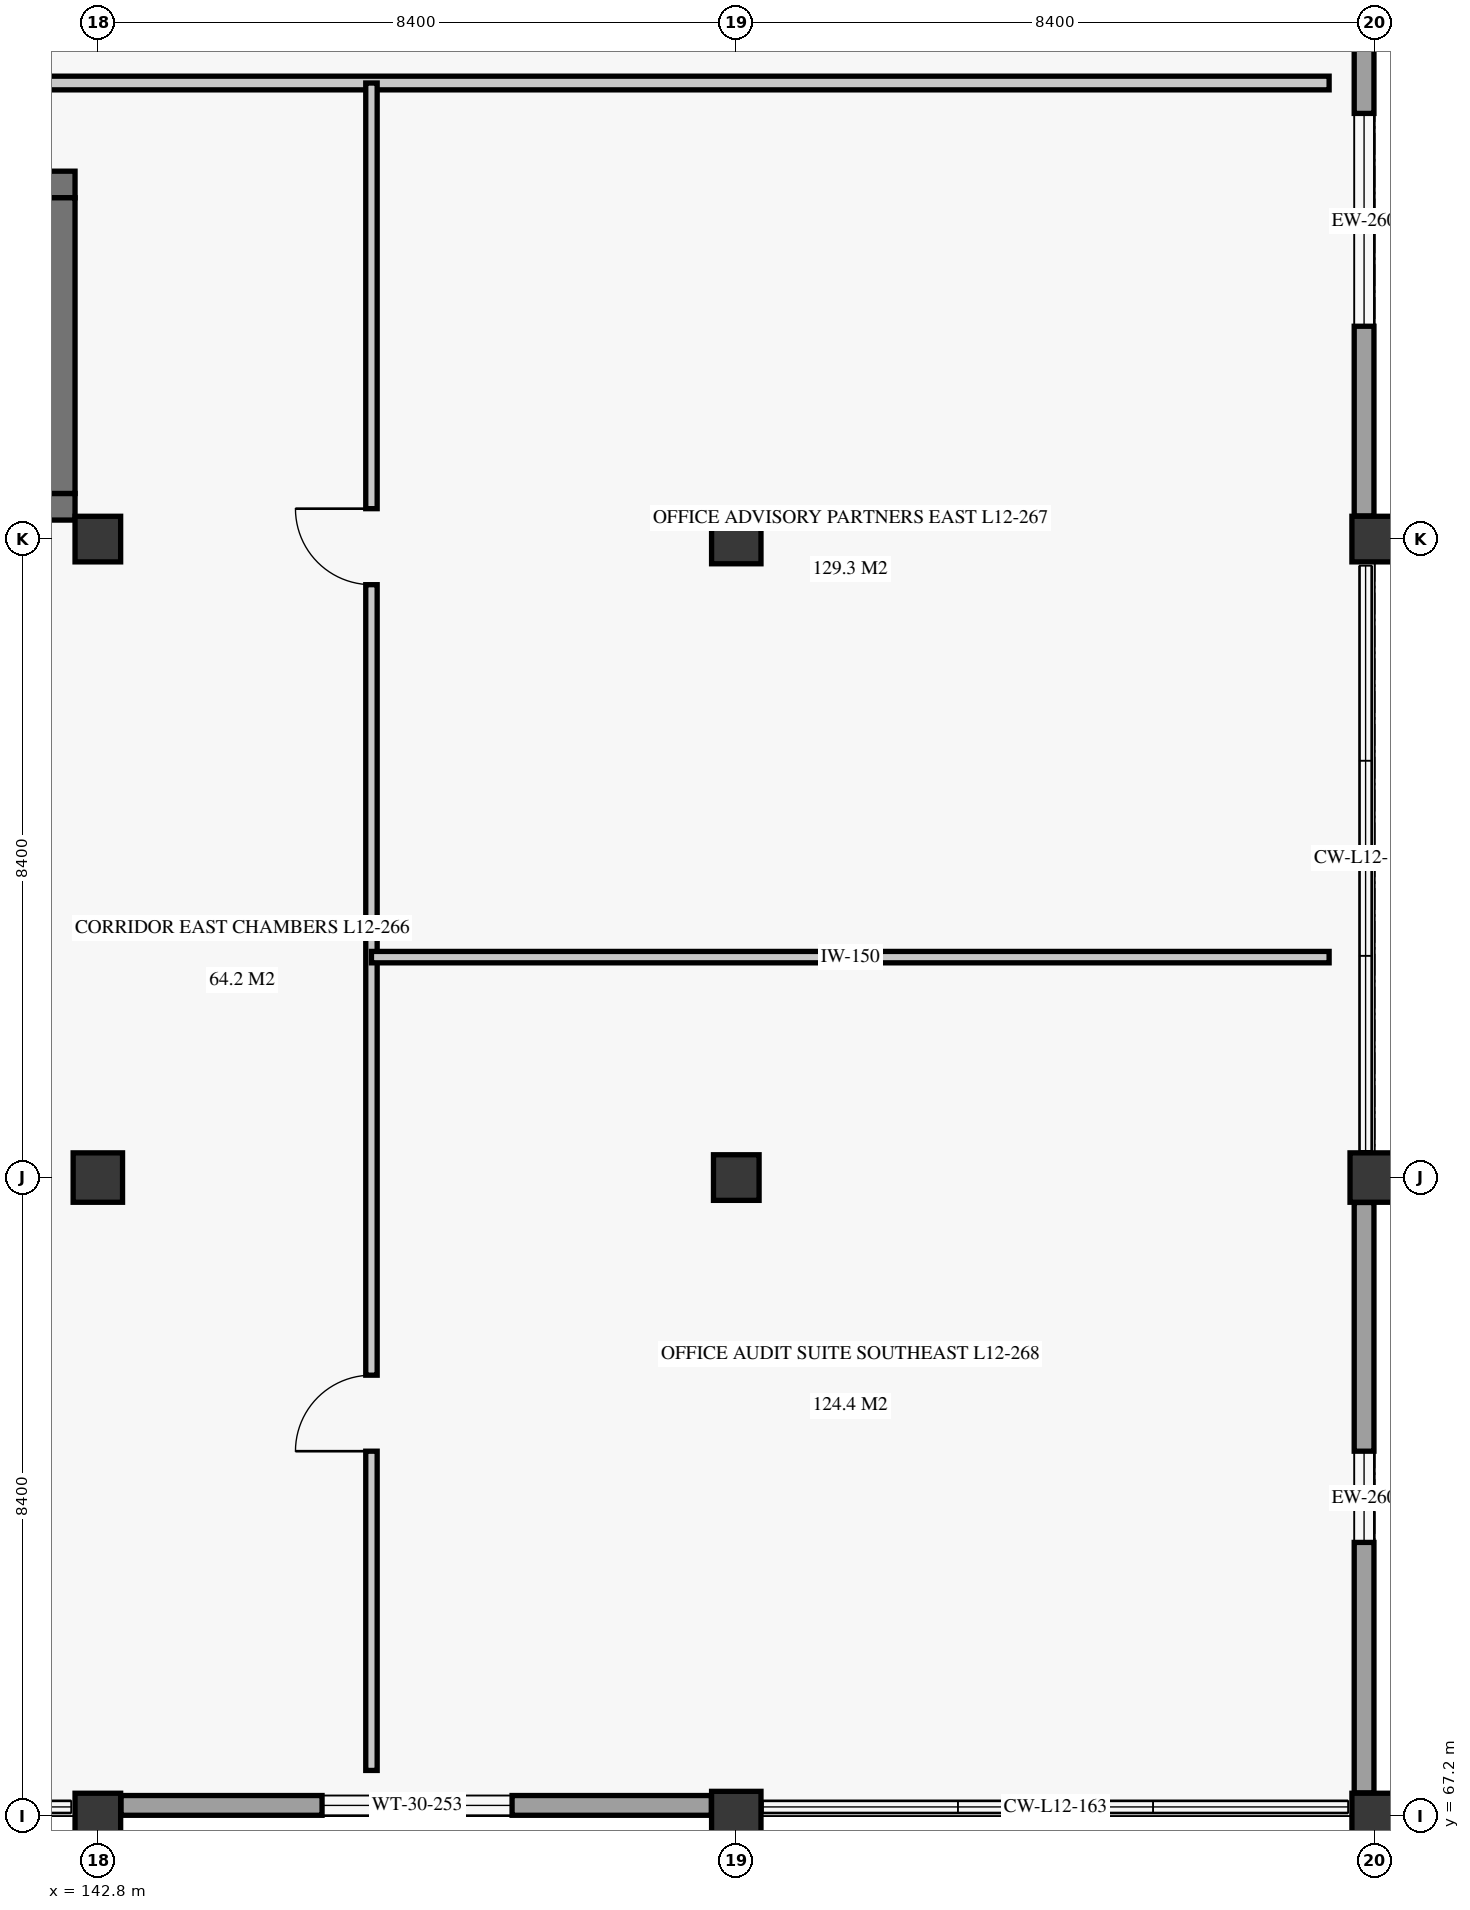
"""IFC4 building model, lengths in metres.
Left out: names, types, materials, properties, quantities, classifications, styles, units other than length and angle.
Written with IfcOpenShell. Run it as: python <this file> out.ifc"""

import sys

from ifc_helpers import new_model, si_unit, direction, frame, frame_2d, origin, origin_2d, place, context, subcontext, project, spatial, rectangle, extrude, element, fill, save


model = new_model("IFC4")
c1 = context("Model", 3, precision=1e-05, world=origin(), true_north=direction((0.0, 1.0)))
c2 = subcontext(c1, "Body", "Model", "MODEL_VIEW")
j1 = project(units=[si_unit("LENGTHUNIT", "METRE"), si_unit("PLANEANGLEUNIT", "RADIAN")], contexts=[c1])
p1 = place(None, origin())
s1 = spatial("IfcSite", under=j1, at=p1, CompositionType="ELEMENT")
p2 = place(p1, origin())
s2 = spatial("IfcBuilding", under=s1, at=p2, CompositionType="ELEMENT")
p3 = place(p2, frame((0.0, 0.0, 50.7)))
s3 = spatial("IfcBuildingStorey", under=s2, at=p3, CompositionType="ELEMENT", Elevation=50.7)
p4 = place(p3, frame((142.8, 67.2, 0.0), z_axis=(0.0, 0.0, 1.0), x_axis=(1.0, 0.0, 0.0)))
e1 = element("IfcColumn", 1, at=p4, inside=s3, PredefinedType="COLUMN", context=c2, shape_type="SweptSolid", body=[
    extrude(rectangle(XDim=0.6, YDim=0.6, at=origin_2d()), origin(), (0.0, 0.0, 1.0), 3.72),
])
p5 = place(p3, frame((142.8, 75.6, 0.0), z_axis=(0.0, 0.0, 1.0), x_axis=(1.0, 0.0, 0.0)))
e2 = element("IfcColumn", 2, at=p5, inside=s3, PredefinedType="COLUMN", context=c2, shape_type="SweptSolid", body=[
    extrude(rectangle(XDim=0.65, YDim=0.65, at=origin_2d()), origin(), (0.0, 0.0, 1.0), 3.72),
])
p6 = place(p3, frame((142.8, 84.0, 0.0), z_axis=(0.0, 0.0, 1.0), x_axis=(1.0, 0.0, 0.0)))
e3 = element("IfcColumn", 3, at=p6, inside=s3, PredefinedType="COLUMN", context=c2, shape_type="SweptSolid", body=[
    extrude(rectangle(XDim=0.6, YDim=0.6, at=origin_2d()), origin(), (0.0, 0.0, 1.0), 3.72),
])
p7 = place(p3, frame((151.2, 67.2, 0.0), z_axis=(0.0, 0.0, 1.0), x_axis=(1.0, 0.0, 0.0)))
e4 = element("IfcColumn", 4, at=p7, inside=s3, PredefinedType="COLUMN", context=c2, shape_type="SweptSolid", body=[
    extrude(rectangle(XDim=0.65, YDim=0.65, at=origin_2d()), origin(), (0.0, 0.0, 1.0), 3.72),
])
p8 = place(p3, frame((151.2, 75.6, 0.0), z_axis=(0.0, 0.0, 1.0), x_axis=(1.0, 0.0, 0.0)))
e5 = element("IfcColumn", 5, at=p8, inside=s3, PredefinedType="COLUMN", context=c2, shape_type="SweptSolid", body=[
    extrude(rectangle(XDim=0.6, YDim=0.6, at=origin_2d()), origin(), (0.0, 0.0, 1.0), 3.72),
])
p9 = place(p3, frame((151.2, 84.0, 0.0), z_axis=(0.0, 0.0, 1.0), x_axis=(1.0, 0.0, 0.0)))
e6 = element("IfcColumn", 6, at=p9, inside=s3, PredefinedType="COLUMN", context=c2, shape_type="SweptSolid", body=[
    extrude(rectangle(XDim=0.65, YDim=0.65, at=origin_2d()), origin(), (0.0, 0.0, 1.0), 3.72),
])
p10 = place(p3, frame((159.6, 67.2, 0.0), z_axis=(0.0, 0.0, 1.0), x_axis=(1.0, 0.0, 0.0)))
e7 = element("IfcColumn", 7, at=p10, inside=s3, PredefinedType="COLUMN", context=c2, shape_type="SweptSolid", body=[
    extrude(rectangle(XDim=0.6, YDim=0.6, at=origin_2d()), origin(), (0.0, 0.0, 1.0), 3.72),
])
p11 = place(p3, frame((159.6, 75.6, 0.0), z_axis=(0.0, 0.0, 1.0), x_axis=(1.0, 0.0, 0.0)))
e8 = element("IfcColumn", 8, at=p11, inside=s3, PredefinedType="COLUMN", context=c2, shape_type="SweptSolid", body=[
    extrude(rectangle(XDim=0.65, YDim=0.65, at=origin_2d()), origin(), (0.0, 0.0, 1.0), 3.72),
])
p12 = place(p3, frame((159.6, 84.0, 0.0), z_axis=(0.0, 0.0, 1.0), x_axis=(1.0, 0.0, 0.0)))
e9 = element("IfcColumn", 9, at=p12, inside=s3, PredefinedType="COLUMN", context=c2, shape_type="SweptSolid", body=[
    extrude(rectangle(XDim=0.6, YDim=0.6, at=origin_2d()), origin(), (0.0, 0.0, 1.0), 3.72),
])
p13 = place(p3, frame((143.104, 67.34, 0.0), z_axis=(0.0, 0.0, 1.0), x_axis=(1.0, 0.0, 0.0)))
e10 = element("IfcWall", 10, at=p13, inside=s3, PredefinedType="SOLIDWALL", context=c2, shape_type="SweptSolid", body=[
    extrude(rectangle(XDim=7.768, YDim=0.26, at=frame_2d((3.884, 0.0))), origin(), (0.0, 0.0, 1.0), 3.04),
])
p14 = place(p13, frame((2.646, 0.0, 0.85)))
e11 = element("IfcOpeningElement", 11, at=p14, cuts=e10, PredefinedType="OPENING", context=c2, shape_type="SweptSolid", body=[
    extrude(rectangle(XDim=2.5, YDim=1.8, at=frame_2d((1.25, 0.9))), frame((0.0, 0.14, 0.0), z_axis=(0.0, -1.0, 0.0), x_axis=(1.0, 0.0, 0.0)), (0.0, 0.0, 1.0), 0.28),
])
p15 = place(p3, frame((159.46, 67.504, 0.0), z_axis=(0.0, 0.0, 1.0), x_axis=(0.0, 1.0, 0.0)))
e12 = element("IfcWall", 12, at=p15, inside=s3, PredefinedType="SOLIDWALL", context=c2, shape_type="SweptSolid", body=[
    extrude(rectangle(XDim=7.768, YDim=0.26, at=frame_2d((3.884, 0.0))), origin(), (0.0, 0.0, 1.0), 3.04),
])
p16 = place(p15, frame((3.296, 0.0, 0.85)))
e13 = element("IfcOpeningElement", 13, at=p16, cuts=e12, PredefinedType="OPENING", context=c2, shape_type="SweptSolid", body=[
    extrude(rectangle(XDim=1.2, YDim=1.6, at=frame_2d((0.6, 0.8))), frame((0.0, 0.14, 0.0), z_axis=(0.0, -1.0, 0.0), x_axis=(1.0, 0.0, 0.0)), (0.0, 0.0, 1.0), 0.28),
])
p17 = place(p3, frame((159.46, 84.304, 0.0), z_axis=(0.0, 0.0, 1.0), x_axis=(0.0, 1.0, 0.0)))
e14 = element("IfcWall", 14, at=p17, inside=s3, PredefinedType="SOLIDWALL", context=c2, shape_type="SweptSolid", body=[
    extrude(rectangle(XDim=7.768, YDim=0.26, at=frame_2d((3.884, 0.0))), origin(), (0.0, 0.0, 1.0), 3.04),
])
p18 = place(p17, frame((2.496, 0.0, 0.85)))
e15 = element("IfcOpeningElement", 15, at=p18, cuts=e14, PredefinedType="OPENING", context=c2, shape_type="SweptSolid", body=[
    extrude(rectangle(XDim=2.8, YDim=1.85, at=frame_2d((1.4, 0.925))), frame((0.0, 0.14, 0.0), z_axis=(0.0, -1.0, 0.0), x_axis=(1.0, 0.0, 0.0)), (0.0, 0.0, 1.0), 0.28),
])
p19 = place(p3, frame((132.75, 84.425, 0.0), z_axis=(0.0, 0.0, 1.0), x_axis=(1.0, 0.0, 0.0)))
e16 = element("IfcWall", 16, at=p19, inside=s3, PredefinedType="SHEAR", context=c2, shape_type="SweptSolid", body=[
    extrude(rectangle(XDim=9.75, YDim=0.35, at=frame_2d((4.875, 0.0))), origin(), (0.0, 0.0, 1.0), 3.72),
])
p20 = place(p3, frame((132.75, 88.665, 0.0), z_axis=(0.0, 0.0, 1.0), x_axis=(1.0, 0.0, 0.0)))
e17 = element("IfcWall", 17, at=p20, inside=s3, PredefinedType="SHEAR", context=c2, shape_type="SweptSolid", body=[
    extrude(rectangle(XDim=9.75, YDim=0.35, at=frame_2d((4.875, 0.0))), origin(), (0.0, 0.0, 1.0), 3.72),
])
p21 = place(p20, frame((0.72, 0.0, 0.0)))
e18 = element("IfcOpeningElement", 18, at=p21, cuts=e17, PredefinedType="OPENING", context=c2, shape_type="SweptSolid", body=[
    extrude(rectangle(XDim=1.25, YDim=2.2, at=frame_2d((0.625, 1.1))), frame((0.0, 0.185, 0.0), z_axis=(0.0, -1.0, 0.0), x_axis=(1.0, 0.0, 0.0)), (0.0, 0.0, 1.0), 0.37),
])
p22 = place(p3, frame((142.325, 84.6, 0.0), z_axis=(0.0, 0.0, 1.0), x_axis=(0.0, 1.0, 0.0)))
e19 = element("IfcWall", 19, at=p22, inside=s3, PredefinedType="SHEAR", context=c2, shape_type="SweptSolid", body=[
    extrude(rectangle(XDim=3.89, YDim=0.35, at=frame_2d((1.945, 0.0))), origin(), (0.0, 0.0, 1.0), 3.72),
])
p23 = place(p3, frame((118.2, 90.0, 0.0), z_axis=(0.0, 0.0, 1.0), x_axis=(1.0, 0.0, 0.0)))
e20 = element("IfcWall", 20, at=p23, inside=s3, PredefinedType="PARTITIONING", context=c2, shape_type="SweptSolid", body=[
    extrude(rectangle(XDim=40.8, YDim=0.18, at=frame_2d((20.4, 0.0))), origin(), (0.0, 0.0, 1.0), 3.34),
])
p24 = place(p23, frame((3.2, 0.0, 0.0)))
e21 = element("IfcOpeningElement", 21, at=p24, cuts=e20, PredefinedType="OPENING", context=c2, shape_type="SweptSolid", body=[
    extrude(rectangle(XDim=1.05, YDim=2.2, at=frame_2d((0.525, 1.1))), frame((0.0, 0.1, 0.0), z_axis=(0.0, -1.0, 0.0), x_axis=(1.0, 0.0, 0.0)), (0.0, 0.0, 1.0), 0.2),
])
p25 = place(p23, frame((20.6, 0.0, 0.0)))
e22 = element("IfcOpeningElement", 22, at=p25, cuts=e20, PredefinedType="OPENING", context=c2, shape_type="SweptSolid", body=[
    extrude(rectangle(XDim=1.05, YDim=2.2, at=frame_2d((0.525, 1.1))), frame((0.0, 0.1, 0.0), z_axis=(0.0, -1.0, 0.0), x_axis=(1.0, 0.0, 0.0)), (0.0, 0.0, 1.0), 0.2),
])
p26 = place(p3, frame((146.4, 67.8, 0.0), z_axis=(0.0, 0.0, 1.0), x_axis=(0.0, 1.0, 0.0)))
e23 = element("IfcWall", 23, at=p26, inside=s3, PredefinedType="PARTITIONING", context=c2, shape_type="SweptSolid", body=[
    extrude(rectangle(XDim=22.2, YDim=0.15, at=frame_2d((11.1, 0.0))), origin(), (0.0, 0.0, 1.0), 3.34),
])
p27 = place(p26, frame((4.2, 0.0, 0.0)))
e24 = element("IfcOpeningElement", 24, at=p27, cuts=e23, PredefinedType="OPENING", context=c2, shape_type="SweptSolid", body=[
    extrude(rectangle(XDim=1.0, YDim=2.1, at=frame_2d((0.5, 1.05))), frame((0.0, 0.085, 0.0), z_axis=(0.0, -1.0, 0.0), x_axis=(1.0, 0.0, 0.0)), (0.0, 0.0, 1.0), 0.17),
])
p28 = place(p26, frame((15.6, 0.0, 0.0)))
e25 = element("IfcOpeningElement", 25, at=p28, cuts=e23, PredefinedType="OPENING", context=c2, shape_type="SweptSolid", body=[
    extrude(rectangle(XDim=1.0, YDim=2.1, at=frame_2d((0.5, 1.05))), frame((0.0, 0.085, 0.0), z_axis=(0.0, -1.0, 0.0), x_axis=(1.0, 0.0, 0.0)), (0.0, 0.0, 1.0), 0.17),
])
p29 = place(p3, frame((146.4, 78.5, 0.0), z_axis=(0.0, 0.0, 1.0), x_axis=(1.0, 0.0, 0.0)))
e26 = element("IfcWall", 26, at=p29, inside=s3, PredefinedType="PARTITIONING", context=c2, shape_type="SweptSolid", body=[
    extrude(rectangle(XDim=12.6, YDim=0.15, at=frame_2d((6.3, 0.0))), origin(), (0.0, 0.0, 1.0), 3.34),
])
p30 = place(p14, origin())
e27 = element("IfcWindow", 27, at=p30, inside=s3, PartitioningType="SINGLE_PANEL", PredefinedType="WINDOW", context=c2, shape_type="SweptSolid", body=[
    extrude(rectangle(XDim=2.5, YDim=1.8, at=frame_2d((1.25, 0.9))), frame((0.0, 0.03, 0.0), z_axis=(0.0, -1.0, 0.0), x_axis=(1.0, 0.0, 0.0)), (0.0, 0.0, 1.0), 0.06),
])
fill(e11, e27)
p31 = place(p16, origin())
e28 = element("IfcWindow", 28, at=p31, inside=s3, PartitioningType="SINGLE_PANEL", PredefinedType="WINDOW", context=c2, shape_type="SweptSolid", body=[
    extrude(rectangle(XDim=1.2, YDim=1.6, at=frame_2d((0.6, 0.8))), frame((0.0, 0.03, 0.0), z_axis=(0.0, -1.0, 0.0), x_axis=(1.0, 0.0, 0.0)), (0.0, 0.0, 1.0), 0.06),
])
fill(e13, e28)
p32 = place(p18, origin())
e29 = element("IfcWindow", 29, at=p32, inside=s3, PartitioningType="SINGLE_PANEL", PredefinedType="WINDOW", context=c2, shape_type="SweptSolid", body=[
    extrude(rectangle(XDim=2.8, YDim=1.85, at=frame_2d((1.4, 0.925))), frame((0.0, 0.03, 0.0), z_axis=(0.0, -1.0, 0.0), x_axis=(1.0, 0.0, 0.0)), (0.0, 0.0, 1.0), 0.06),
])
fill(e15, e29)
p33 = place(p27, origin())
e30 = element("IfcDoor", 30, at=p33, inside=s3, OperationType="SINGLE_SWING_LEFT", PredefinedType="DOOR", context=c2, shape_type="SweptSolid", body=[
    extrude(rectangle(XDim=1.0, YDim=2.1, at=frame_2d((0.5, 1.05))), frame((0.0, 0.025, 0.0), z_axis=(0.0, -1.0, 0.0), x_axis=(1.0, 0.0, 0.0)), (0.0, 0.0, 1.0), 0.05),
])
fill(e24, e30)
p34 = place(p28, origin())
e31 = element("IfcDoor", 31, at=p34, inside=s3, OperationType="SINGLE_SWING_RIGHT", PredefinedType="DOOR", context=c2, shape_type="SweptSolid", body=[
    extrude(rectangle(XDim=1.0, YDim=2.1, at=frame_2d((0.5, 1.05))), frame((0.0, 0.025, 0.0), z_axis=(0.0, -1.0, 0.0), x_axis=(1.0, 0.0, 0.0)), (0.0, 0.0, 1.0), 0.05),
])
fill(e25, e31)
save(model, sys.argv[1])
